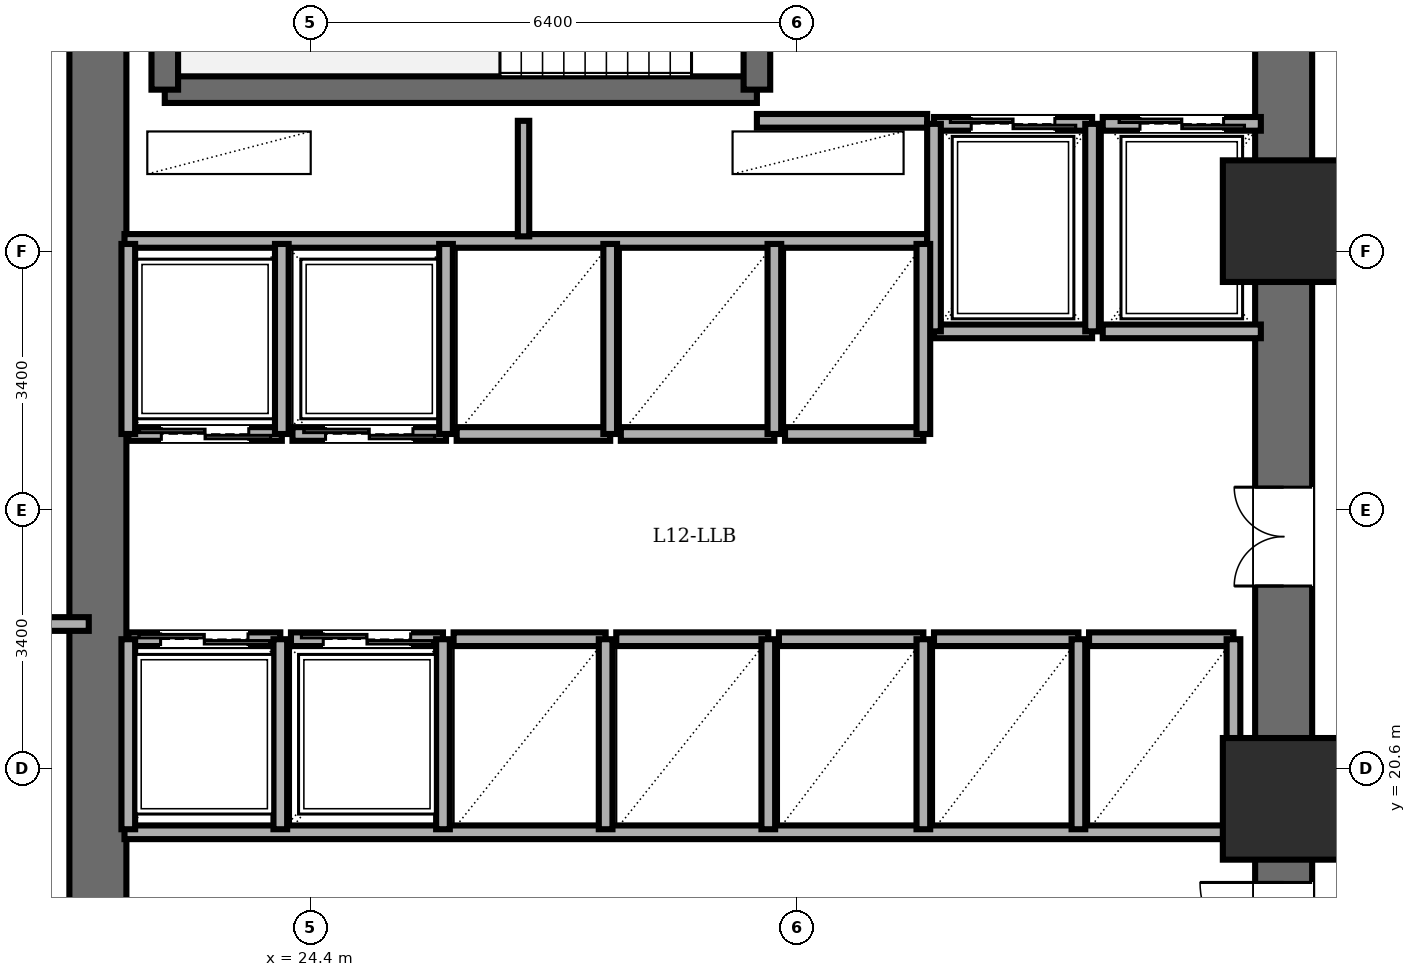
"""IFC4 building model, lengths in metres.
Left out: names, types, materials, properties, quantities, classifications, styles, units other than length and angle.
Written with IfcOpenShell. Run it as: python <this file> out.ifc"""

import sys

from ifc_helpers import new_model, si_unit, direction, frame, frame_2d, origin, origin_2d, place, context, subcontext, project, spatial, rectangle, extrude, element, fill, save


model = new_model("IFC4")
c1 = context("Model", 3, precision=1e-05, world=origin(), true_north=direction((0.0, 1.0)))
c2 = subcontext(c1, "Body", "Model", "MODEL_VIEW")
j1 = project(units=[si_unit("LENGTHUNIT", "METRE"), si_unit("PLANEANGLEUNIT", "RADIAN")], contexts=[c1])
p1 = place(None, origin())
s1 = spatial("IfcSite", under=j1, at=p1, CompositionType="ELEMENT")
p2 = place(p1, origin())
s2 = spatial("IfcBuilding", under=s1, at=p2, CompositionType="ELEMENT")
p3 = place(p2, frame((0.0, 0.0, 46.8)))
s3 = spatial("IfcBuildingStorey", under=s2, at=p3, CompositionType="ELEMENT", Elevation=46.8)
for number, where, z_axis, x_axis in (
    (1, (37.2, 20.2, 0.0), (0.0, 0.0, 1.0), (1.0, 0.0, 0.0)),
    (2, (37.2, 27.8, 0.0), (0.0, 0.0, 1.0), (1.0, 0.0, 0.0)),
):
    element("IfcColumn", number, at=place(p3, frame(where, z_axis=z_axis, x_axis=x_axis)), inside=s3, PredefinedType="COLUMN", context=c2, shape_type="SweptSolid", body=[
        extrude(rectangle(XDim=1.6, YDim=1.6, at=origin_2d()), origin(), (0.0, 0.0, 1.0), 3.6),
    ])
p4 = place(p3, frame((21.6, 14.4, 0.0), z_axis=(0.0, 0.0, 1.0), x_axis=(0.0, 1.0, 0.0)))
e3 = element("IfcWall", 3, at=p4, inside=s3, PredefinedType="SHEAR", context=c2, shape_type="SweptSolid", body=[
    extrude(rectangle(XDim=19.2, YDim=0.75, at=frame_2d((9.6, 0.0))), origin(), (0.0, 0.0, 1.0), 3.4),
])
p5 = place(p3, frame((37.2, 14.4, 0.0), z_axis=(0.0, 0.0, 1.0), x_axis=(0.0, 1.0, 0.0)))
e4 = element("IfcWall", 4, at=p5, inside=s3, PredefinedType="SHEAR", context=c2, shape_type="SweptSolid", body=[
    extrude(rectangle(XDim=19.2, YDim=0.75, at=frame_2d((9.6, 0.0))), origin(), (0.0, 0.0, 1.0), 3.4),
])
p6 = place(p5, frame((15.8, 0.0, 0.0)))
e5 = element("IfcOpeningElement", 5, at=p6, cuts=e4, PredefinedType="OPENING", context=c2, shape_type="SweptSolid", body=[
    extrude(rectangle(XDim=1.15, YDim=2.15, at=frame_2d((0.575, 1.075))), frame((0.0, 0.385, 0.0), z_axis=(0.0, -1.0, 0.0), x_axis=(1.0, 0.0, 0.0)), (0.0, 0.0, 1.0), 0.77),
])
p7 = place(p5, frame((3.6, 0.0, 0.0)))
e6 = element("IfcOpeningElement", 6, at=p7, cuts=e4, PredefinedType="OPENING", context=c2, shape_type="SweptSolid", body=[
    extrude(rectangle(XDim=1.1, YDim=2.15, at=frame_2d((0.55, 1.075))), frame((0.0, 0.385, 0.0), z_axis=(0.0, -1.0, 0.0), x_axis=(1.0, 0.0, 0.0)), (0.0, 0.0, 1.0), 0.77),
])
p8 = place(p5, frame((8.6, 0.0, 0.0)))
e7 = element("IfcOpeningElement", 7, at=p8, cuts=e4, PredefinedType="OPENING", context=c2, shape_type="SweptSolid", body=[
    extrude(rectangle(XDim=1.3, YDim=2.2, at=frame_2d((0.65, 1.1))), frame((0.0, 0.385, 0.0), z_axis=(0.0, -1.0, 0.0), x_axis=(1.0, 0.0, 0.0)), (0.0, 0.0, 1.0), 0.77),
])
p9 = place(p3, frame((22.48, 29.53, 0.0), z_axis=(0.0, 0.0, 1.0), x_axis=(1.0, 0.0, 0.0)))
e8 = element("IfcWall", 8, at=p9, inside=s3, PredefinedType="SOLIDWALL", context=c2, shape_type="SweptSolid", body=[
    extrude(rectangle(XDim=7.79, YDim=0.35, at=frame_2d((3.895, 0.0))), origin(), (0.0, 0.0, 1.0), 3.4),
])
p10 = place(p3, frame((22.48, 29.53, 0.0), z_axis=(0.0, 0.0, 1.0), x_axis=(0.0, 1.0, 0.0)))
e9 = element("IfcWall", 9, at=p10, inside=s3, PredefinedType="SOLIDWALL", context=c2, shape_type="SweptSolid", body=[
    extrude(rectangle(XDim=3.58, YDim=0.35, at=frame_2d((1.79, 0.0))), origin(), (0.0, 0.0, 1.0), 3.4),
])
p11 = place(p3, frame((30.27, 29.53, 0.0), z_axis=(0.0, 0.0, 1.0), x_axis=(0.0, 1.0, 0.0)))
e10 = element("IfcWall", 10, at=p11, inside=s3, PredefinedType="SOLIDWALL", context=c2, shape_type="SweptSolid", body=[
    extrude(rectangle(XDim=3.58, YDim=0.35, at=frame_2d((1.79, 0.0))), origin(), (0.0, 0.0, 1.0), 3.4),
])
p12 = place(p11, frame((1.25, 0.0, 0.0)))
e11 = element("IfcOpeningElement", 11, at=p12, cuts=e10, PredefinedType="OPENING", context=c2, shape_type="SweptSolid", body=[
    extrude(rectangle(XDim=1.1, YDim=2.15, at=frame_2d((0.55, 1.075))), frame((0.0, 0.185, 0.0), z_axis=(0.0, -1.0, 0.0), x_axis=(1.0, 0.0, 0.0)), (0.0, 0.0, 1.0), 0.37),
])
p13 = place(p3, frame((30.27, 29.12, 0.0), z_axis=(0.0, 0.0, 1.0), x_axis=(1.0, 0.0, 0.0)))
e12 = element("IfcWall", 12, at=p13, inside=s3, PredefinedType="PARTITIONING", context=c2, shape_type="SweptSolid", body=[
    extrude(rectangle(XDim=2.24, YDim=0.18, at=frame_2d((1.12, 0.0))), origin(), (0.0, 0.0, 1.0), 3.4),
])
p14 = place(p3, frame((21.95, 27.54, 0.0), z_axis=(0.0, 0.0, 1.0), x_axis=(1.0, 0.0, 0.0)))
e13 = element("IfcWall", 13, at=p14, inside=s3, PredefinedType="PARTITIONING", context=c2, shape_type="SweptSolid", body=[
    extrude(rectangle(XDim=10.56, YDim=0.18, at=frame_2d((5.28, 0.0))), origin(), (0.0, 0.0, 1.0), 3.4),
])
p15 = place(p3, frame((27.2, 27.6, 0.0), z_axis=(0.0, 0.0, 1.0), x_axis=(0.0, 1.0, 0.0)))
e14 = element("IfcWall", 14, at=p15, inside=s3, PredefinedType="PARTITIONING", context=c2, shape_type="SweptSolid", body=[
    extrude(rectangle(XDim=1.52, YDim=0.15, at=frame_2d((0.76, 0.0))), origin(), (0.0, 0.0, 1.0), 3.4),
])
p16 = place(p3, frame((21.95, 19.76, 0.0), z_axis=(0.0, 0.0, 1.0), x_axis=(1.0, 0.0, 0.0)))
e15 = element("IfcWall", 15, at=p16, inside=s3, PredefinedType="PARTITIONING", context=c2, shape_type="SweptSolid", body=[
    extrude(rectangle(XDim=14.87, YDim=0.18, at=frame_2d((7.435, 0.0))), origin(), (0.0, 0.0, 1.0), 3.4),
])
p17 = place(p3, frame((32.6, 29.08, 0.0), z_axis=(0.0, 0.0, 1.0), x_axis=(1.0, 0.0, 0.0)))
e16 = element("IfcWall", 16, at=p17, inside=s3, PredefinedType="PARTITIONING", context=c2, shape_type="SweptSolid", body=[
    extrude(rectangle(XDim=2.08, YDim=0.18, at=frame_2d((1.04, 0.0))), origin(), (0.0, 0.0, 1.0), 3.4),
])
p18 = place(p17, frame((0.49, 0.0, 0.0)))
e17 = element("IfcOpeningElement", 17, at=p18, cuts=e16, PredefinedType="OPENING", context=c2, shape_type="SweptSolid", body=[
    extrude(rectangle(XDim=1.1, YDim=2.2, at=frame_2d((0.55, 1.1))), frame((0.0, 0.1, 0.0), z_axis=(0.0, -1.0, 0.0), x_axis=(1.0, 0.0, 0.0)), (0.0, 0.0, 1.0), 0.2),
])
p19 = place(p3, frame((34.68, 26.35, 0.0), z_axis=(0.0, 0.0, 1.0), x_axis=(-1.0, 0.0, 0.0)))
e18 = element("IfcWall", 18, at=p19, inside=s3, PredefinedType="PARTITIONING", context=c2, shape_type="SweptSolid", body=[
    extrude(rectangle(XDim=2.08, YDim=0.18, at=frame_2d((1.04, 0.0))), origin(), (0.0, 0.0, 1.0), 3.4),
])
for number, where, z_axis, x_axis in (
    (19, (34.68, 26.35, 0.0), (0.0, 0.0, 1.0), (0.0, 1.0, 0.0)),
    (20, (32.6, 29.08, 0.0), (0.0, 0.0, 1.0), (0.0, -1.0, 0.0)),
):
    element("IfcWall", number, at=place(p3, frame(where, z_axis=z_axis, x_axis=x_axis)), inside=s3, PredefinedType="PARTITIONING", context=c2, shape_type="SweptSolid", body=[
        extrude(rectangle(XDim=2.73, YDim=0.18, at=frame_2d((1.365, 0.0))), origin(), (0.0, 0.0, 1.0), 3.4),
    ])
p20 = place(p3, frame((34.82, 29.08, 0.0), z_axis=(0.0, 0.0, 1.0), x_axis=(1.0, 0.0, 0.0)))
e21 = element("IfcWall", 21, at=p20, inside=s3, PredefinedType="PARTITIONING", context=c2, shape_type="SweptSolid", body=[
    extrude(rectangle(XDim=2.08, YDim=0.18, at=frame_2d((1.04, 0.0))), origin(), (0.0, 0.0, 1.0), 3.4),
])
p21 = place(p20, frame((0.49, 0.0, 0.0)))
e22 = element("IfcOpeningElement", 22, at=p21, cuts=e21, PredefinedType="OPENING", context=c2, shape_type="SweptSolid", body=[
    extrude(rectangle(XDim=1.1, YDim=2.2, at=frame_2d((0.55, 1.1))), frame((0.0, 0.1, 0.0), z_axis=(0.0, -1.0, 0.0), x_axis=(1.0, 0.0, 0.0)), (0.0, 0.0, 1.0), 0.2),
])
p22 = place(p3, frame((36.9, 26.35, 0.0), z_axis=(0.0, 0.0, 1.0), x_axis=(-1.0, 0.0, 0.0)))
e23 = element("IfcWall", 23, at=p22, inside=s3, PredefinedType="PARTITIONING", context=c2, shape_type="SweptSolid", body=[
    extrude(rectangle(XDim=2.08, YDim=0.18, at=frame_2d((1.04, 0.0))), origin(), (0.0, 0.0, 1.0), 3.4),
])
p23 = place(p3, frame((24.02, 25.0, 0.0), z_axis=(0.0, 0.0, 1.0), x_axis=(-1.0, 0.0, 0.0)))
e24 = element("IfcWall", 24, at=p23, inside=s3, PredefinedType="PARTITIONING", context=c2, shape_type="SweptSolid", body=[
    extrude(rectangle(XDim=2.02, YDim=0.18, at=frame_2d((1.01, 0.0))), origin(), (0.0, 0.0, 1.0), 3.4),
])
p24 = place(p23, frame((0.435, 0.0, 0.0)))
e25 = element("IfcOpeningElement", 25, at=p24, cuts=e24, PredefinedType="OPENING", context=c2, shape_type="SweptSolid", body=[
    extrude(rectangle(XDim=1.15, YDim=2.2, at=frame_2d((0.575, 1.1))), frame((0.0, 0.1, 0.0), z_axis=(0.0, -1.0, 0.0), x_axis=(1.0, 0.0, 0.0)), (0.0, 0.0, 1.0), 0.2),
])
for number, where, z_axis, x_axis in (
    (26, (24.02, 25.0, 0.0), (0.0, 0.0, 1.0), (0.0, 1.0, 0.0)),
    (27, (22.0, 27.5, 0.0), (0.0, 0.0, 1.0), (0.0, -1.0, 0.0)),
):
    element("IfcWall", number, at=place(p3, frame(where, z_axis=z_axis, x_axis=x_axis)), inside=s3, PredefinedType="PARTITIONING", context=c2, shape_type="SweptSolid", body=[
        extrude(rectangle(XDim=2.5, YDim=0.18, at=frame_2d((1.25, 0.0))), origin(), (0.0, 0.0, 1.0), 3.4),
    ])
p25 = place(p3, frame((26.18, 25.0, 0.0), z_axis=(0.0, 0.0, 1.0), x_axis=(-1.0, 0.0, 0.0)))
e28 = element("IfcWall", 28, at=p25, inside=s3, PredefinedType="PARTITIONING", context=c2, shape_type="SweptSolid", body=[
    extrude(rectangle(XDim=2.02, YDim=0.18, at=frame_2d((1.01, 0.0))), origin(), (0.0, 0.0, 1.0), 3.4),
])
p26 = place(p25, frame((0.435, 0.0, 0.0)))
e29 = element("IfcOpeningElement", 29, at=p26, cuts=e28, PredefinedType="OPENING", context=c2, shape_type="SweptSolid", body=[
    extrude(rectangle(XDim=1.15, YDim=2.2, at=frame_2d((0.575, 1.1))), frame((0.0, 0.1, 0.0), z_axis=(0.0, -1.0, 0.0), x_axis=(1.0, 0.0, 0.0)), (0.0, 0.0, 1.0), 0.2),
])
p27 = place(p3, frame((26.18, 25.0, 0.0), z_axis=(0.0, 0.0, 1.0), x_axis=(0.0, 1.0, 0.0)))
e30 = element("IfcWall", 30, at=p27, inside=s3, PredefinedType="PARTITIONING", context=c2, shape_type="SweptSolid", body=[
    extrude(rectangle(XDim=2.5, YDim=0.18, at=frame_2d((1.25, 0.0))), origin(), (0.0, 0.0, 1.0), 3.4),
])
p28 = place(p3, frame((22.0, 22.3, 0.0), z_axis=(0.0, 0.0, 1.0), x_axis=(1.0, 0.0, 0.0)))
e31 = element("IfcWall", 31, at=p28, inside=s3, PredefinedType="PARTITIONING", context=c2, shape_type="SweptSolid", body=[
    extrude(rectangle(XDim=2.0, YDim=0.18, at=frame_2d((1.0, 0.0))), origin(), (0.0, 0.0, 1.0), 3.4),
])
p29 = place(p28, frame((0.425, 0.0, 0.0)))
e32 = element("IfcOpeningElement", 32, at=p29, cuts=e31, PredefinedType="OPENING", context=c2, shape_type="SweptSolid", body=[
    extrude(rectangle(XDim=1.15, YDim=2.2, at=frame_2d((0.575, 1.1))), frame((0.0, 0.1, 0.0), z_axis=(0.0, -1.0, 0.0), x_axis=(1.0, 0.0, 0.0)), (0.0, 0.0, 1.0), 0.2),
])
for number, where, z_axis, x_axis in (
    (33, (24.0, 19.8, 0.0), (0.0, 0.0, 1.0), (0.0, 1.0, 0.0)),
    (34, (22.0, 22.3, 0.0), (0.0, 0.0, 1.0), (0.0, -1.0, 0.0)),
):
    element("IfcWall", number, at=place(p3, frame(where, z_axis=z_axis, x_axis=x_axis)), inside=s3, PredefinedType="PARTITIONING", context=c2, shape_type="SweptSolid", body=[
        extrude(rectangle(XDim=2.5, YDim=0.18, at=frame_2d((1.25, 0.0))), origin(), (0.0, 0.0, 1.0), 3.4),
    ])
p30 = place(p3, frame((24.14, 22.3, 0.0), z_axis=(0.0, 0.0, 1.0), x_axis=(1.0, 0.0, 0.0)))
e35 = element("IfcWall", 35, at=p30, inside=s3, PredefinedType="PARTITIONING", context=c2, shape_type="SweptSolid", body=[
    extrude(rectangle(XDim=2.0, YDim=0.18, at=frame_2d((1.0, 0.0))), origin(), (0.0, 0.0, 1.0), 3.4),
])
p31 = place(p30, frame((0.425, 0.0, 0.0)))
e36 = element("IfcOpeningElement", 36, at=p31, cuts=e35, PredefinedType="OPENING", context=c2, shape_type="SweptSolid", body=[
    extrude(rectangle(XDim=1.15, YDim=2.2, at=frame_2d((0.575, 1.1))), frame((0.0, 0.1, 0.0), z_axis=(0.0, -1.0, 0.0), x_axis=(1.0, 0.0, 0.0)), (0.0, 0.0, 1.0), 0.2),
])
p32 = place(p3, frame((26.14, 19.8, 0.0), z_axis=(0.0, 0.0, 1.0), x_axis=(0.0, 1.0, 0.0)))
e37 = element("IfcWall", 37, at=p32, inside=s3, PredefinedType="PARTITIONING", context=c2, shape_type="SweptSolid", body=[
    extrude(rectangle(XDim=2.5, YDim=0.18, at=frame_2d((1.25, 0.0))), origin(), (0.0, 0.0, 1.0), 3.4),
])
p33 = place(p3, frame((28.34, 25.0, 0.0), z_axis=(0.0, 0.0, 1.0), x_axis=(-1.0, 0.0, 0.0)))
e38 = element("IfcWall", 38, at=p33, inside=s3, PredefinedType="PARTITIONING", context=c2, shape_type="SweptSolid", body=[
    extrude(rectangle(XDim=2.02, YDim=0.18, at=frame_2d((1.01, 0.0))), origin(), (0.0, 0.0, 1.0), 3.4),
])
p34 = place(p3, frame((28.34, 25.0, 0.0), z_axis=(0.0, 0.0, 1.0), x_axis=(0.0, 1.0, 0.0)))
e39 = element("IfcWall", 39, at=p34, inside=s3, PredefinedType="PARTITIONING", context=c2, shape_type="SweptSolid", body=[
    extrude(rectangle(XDim=2.5, YDim=0.18, at=frame_2d((1.25, 0.0))), origin(), (0.0, 0.0, 1.0), 3.4),
])
p35 = place(p3, frame((30.5, 25.0, 0.0), z_axis=(0.0, 0.0, 1.0), x_axis=(-1.0, 0.0, 0.0)))
e40 = element("IfcWall", 40, at=p35, inside=s3, PredefinedType="PARTITIONING", context=c2, shape_type="SweptSolid", body=[
    extrude(rectangle(XDim=2.02, YDim=0.18, at=frame_2d((1.01, 0.0))), origin(), (0.0, 0.0, 1.0), 3.4),
])
p36 = place(p3, frame((30.5, 25.0, 0.0), z_axis=(0.0, 0.0, 1.0), x_axis=(0.0, 1.0, 0.0)))
e41 = element("IfcWall", 41, at=p36, inside=s3, PredefinedType="PARTITIONING", context=c2, shape_type="SweptSolid", body=[
    extrude(rectangle(XDim=2.5, YDim=0.18, at=frame_2d((1.25, 0.0))), origin(), (0.0, 0.0, 1.0), 3.4),
])
p37 = place(p3, frame((26.28, 22.3, 0.0), z_axis=(0.0, 0.0, 1.0), x_axis=(1.0, 0.0, 0.0)))
e42 = element("IfcWall", 42, at=p37, inside=s3, PredefinedType="PARTITIONING", context=c2, shape_type="SweptSolid", body=[
    extrude(rectangle(XDim=2.0, YDim=0.18, at=frame_2d((1.0, 0.0))), origin(), (0.0, 0.0, 1.0), 3.4),
])
p38 = place(p3, frame((28.28, 19.8, 0.0), z_axis=(0.0, 0.0, 1.0), x_axis=(0.0, 1.0, 0.0)))
e43 = element("IfcWall", 43, at=p38, inside=s3, PredefinedType="PARTITIONING", context=c2, shape_type="SweptSolid", body=[
    extrude(rectangle(XDim=2.5, YDim=0.18, at=frame_2d((1.25, 0.0))), origin(), (0.0, 0.0, 1.0), 3.4),
])
p39 = place(p3, frame((28.42, 22.3, 0.0), z_axis=(0.0, 0.0, 1.0), x_axis=(1.0, 0.0, 0.0)))
e44 = element("IfcWall", 44, at=p39, inside=s3, PredefinedType="PARTITIONING", context=c2, shape_type="SweptSolid", body=[
    extrude(rectangle(XDim=2.0, YDim=0.18, at=frame_2d((1.0, 0.0))), origin(), (0.0, 0.0, 1.0), 3.4),
])
p40 = place(p3, frame((30.42, 19.8, 0.0), z_axis=(0.0, 0.0, 1.0), x_axis=(0.0, 1.0, 0.0)))
e45 = element("IfcWall", 45, at=p40, inside=s3, PredefinedType="PARTITIONING", context=c2, shape_type="SweptSolid", body=[
    extrude(rectangle(XDim=2.5, YDim=0.18, at=frame_2d((1.25, 0.0))), origin(), (0.0, 0.0, 1.0), 3.4),
])
p41 = place(p3, frame((32.46, 25.0, 0.0), z_axis=(0.0, 0.0, 1.0), x_axis=(-1.0, 0.0, 0.0)))
e46 = element("IfcWall", 46, at=p41, inside=s3, PredefinedType="PARTITIONING", context=c2, shape_type="SweptSolid", body=[
    extrude(rectangle(XDim=1.82, YDim=0.18, at=frame_2d((0.91, 0.0))), origin(), (0.0, 0.0, 1.0), 3.4),
])
p42 = place(p3, frame((32.46, 25.0, 0.0), z_axis=(0.0, 0.0, 1.0), x_axis=(0.0, 1.0, 0.0)))
e47 = element("IfcWall", 47, at=p42, inside=s3, PredefinedType="PARTITIONING", context=c2, shape_type="SweptSolid", body=[
    extrude(rectangle(XDim=2.5, YDim=0.18, at=frame_2d((1.25, 0.0))), origin(), (0.0, 0.0, 1.0), 3.4),
])
p43 = place(p3, frame((30.56, 22.3, 0.0), z_axis=(0.0, 0.0, 1.0), x_axis=(1.0, 0.0, 0.0)))
e48 = element("IfcWall", 48, at=p43, inside=s3, PredefinedType="PARTITIONING", context=c2, shape_type="SweptSolid", body=[
    extrude(rectangle(XDim=1.9, YDim=0.18, at=frame_2d((0.95, 0.0))), origin(), (0.0, 0.0, 1.0), 3.4),
])
p44 = place(p3, frame((32.46, 19.8, 0.0), z_axis=(0.0, 0.0, 1.0), x_axis=(0.0, 1.0, 0.0)))
e49 = element("IfcWall", 49, at=p44, inside=s3, PredefinedType="PARTITIONING", context=c2, shape_type="SweptSolid", body=[
    extrude(rectangle(XDim=2.5, YDim=0.18, at=frame_2d((1.25, 0.0))), origin(), (0.0, 0.0, 1.0), 3.4),
])
p45 = place(p3, frame((32.6, 22.3, 0.0), z_axis=(0.0, 0.0, 1.0), x_axis=(1.0, 0.0, 0.0)))
e50 = element("IfcWall", 50, at=p45, inside=s3, PredefinedType="PARTITIONING", context=c2, shape_type="SweptSolid", body=[
    extrude(rectangle(XDim=1.9, YDim=0.18, at=frame_2d((0.95, 0.0))), origin(), (0.0, 0.0, 1.0), 3.4),
])
p46 = place(p3, frame((34.5, 19.8, 0.0), z_axis=(0.0, 0.0, 1.0), x_axis=(0.0, 1.0, 0.0)))
e51 = element("IfcWall", 51, at=p46, inside=s3, PredefinedType="PARTITIONING", context=c2, shape_type="SweptSolid", body=[
    extrude(rectangle(XDim=2.5, YDim=0.18, at=frame_2d((1.25, 0.0))), origin(), (0.0, 0.0, 1.0), 3.4),
])
p47 = place(p3, frame((34.64, 22.3, 0.0), z_axis=(0.0, 0.0, 1.0), x_axis=(1.0, 0.0, 0.0)))
e52 = element("IfcWall", 52, at=p47, inside=s3, PredefinedType="PARTITIONING", context=c2, shape_type="SweptSolid", body=[
    extrude(rectangle(XDim=1.9, YDim=0.18, at=frame_2d((0.95, 0.0))), origin(), (0.0, 0.0, 1.0), 3.4),
])
p48 = place(p3, frame((36.54, 19.8, 0.0), z_axis=(0.0, 0.0, 1.0), x_axis=(0.0, 1.0, 0.0)))
e53 = element("IfcWall", 53, at=p48, inside=s3, PredefinedType="PARTITIONING", context=c2, shape_type="SweptSolid", body=[
    extrude(rectangle(XDim=2.5, YDim=0.18, at=frame_2d((1.25, 0.0))), origin(), (0.0, 0.0, 1.0), 3.4),
])
p49 = place(p3, frame((3.4, 22.5, 0.0), z_axis=(0.0, 0.0, 1.0), x_axis=(1.0, 0.0, 0.0)))
e54 = element("IfcWall", 54, at=p49, inside=s3, PredefinedType="PARTITIONING", context=c2, shape_type="SweptSolid", body=[
    extrude(rectangle(XDim=18.08, YDim=0.18, at=frame_2d((9.04, 0.0))), origin(), (0.0, 0.0, 1.0), 3.4),
])
p50 = place(p7, origin())
e55 = element("IfcDoor", 55, at=p50, inside=s3, OperationType="SINGLE_SWING_RIGHT", PredefinedType="DOOR", context=c2, shape_type="SweptSolid", body=[
    extrude(rectangle(XDim=1.1, YDim=2.15, at=frame_2d((0.55, 1.075))), frame((0.0, 0.025, 0.0), z_axis=(0.0, -1.0, 0.0), x_axis=(1.0, 0.0, 0.0)), (0.0, 0.0, 1.0), 0.05),
])
fill(e6, e55)
p51 = place(p18, origin())
e56 = element("IfcDoor", 56, at=p51, inside=s3, OperationType="DOUBLE_DOOR_SLIDING", PredefinedType="DOOR", context=c2, shape_type="SweptSolid", body=[
    extrude(rectangle(XDim=1.1, YDim=2.2, at=frame_2d((0.55, 1.1))), frame((0.0, 0.025, 0.0), z_axis=(0.0, -1.0, 0.0), x_axis=(1.0, 0.0, 0.0)), (0.0, 0.0, 1.0), 0.05),
])
fill(e17, e56)
p52 = place(p21, origin())
e57 = element("IfcDoor", 57, at=p52, inside=s3, OperationType="DOUBLE_DOOR_SLIDING", PredefinedType="DOOR", context=c2, shape_type="SweptSolid", body=[
    extrude(rectangle(XDim=1.1, YDim=2.2, at=frame_2d((0.55, 1.1))), frame((0.0, 0.025, 0.0), z_axis=(0.0, -1.0, 0.0), x_axis=(1.0, 0.0, 0.0)), (0.0, 0.0, 1.0), 0.05),
])
fill(e22, e57)
p53 = place(p24, origin())
e58 = element("IfcDoor", 58, at=p53, inside=s3, OperationType="DOUBLE_DOOR_SLIDING", PredefinedType="DOOR", context=c2, shape_type="SweptSolid", body=[
    extrude(rectangle(XDim=1.15, YDim=2.2, at=frame_2d((0.575, 1.1))), frame((0.0, 0.025, 0.0), z_axis=(0.0, -1.0, 0.0), x_axis=(1.0, 0.0, 0.0)), (0.0, 0.0, 1.0), 0.05),
])
fill(e25, e58)
p54 = place(p26, origin())
e59 = element("IfcDoor", 59, at=p54, inside=s3, OperationType="DOUBLE_DOOR_SLIDING", PredefinedType="DOOR", context=c2, shape_type="SweptSolid", body=[
    extrude(rectangle(XDim=1.15, YDim=2.2, at=frame_2d((0.575, 1.1))), frame((0.0, 0.025, 0.0), z_axis=(0.0, -1.0, 0.0), x_axis=(1.0, 0.0, 0.0)), (0.0, 0.0, 1.0), 0.05),
])
fill(e29, e59)
p55 = place(p29, origin())
e60 = element("IfcDoor", 60, at=p55, inside=s3, OperationType="DOUBLE_DOOR_SLIDING", PredefinedType="DOOR", context=c2, shape_type="SweptSolid", body=[
    extrude(rectangle(XDim=1.15, YDim=2.2, at=frame_2d((0.575, 1.1))), frame((0.0, 0.025, 0.0), z_axis=(0.0, -1.0, 0.0), x_axis=(1.0, 0.0, 0.0)), (0.0, 0.0, 1.0), 0.05),
])
fill(e32, e60)
p56 = place(p31, origin())
e61 = element("IfcDoor", 61, at=p56, inside=s3, OperationType="DOUBLE_DOOR_SLIDING", PredefinedType="DOOR", context=c2, shape_type="SweptSolid", body=[
    extrude(rectangle(XDim=1.15, YDim=2.2, at=frame_2d((0.575, 1.1))), frame((0.0, 0.025, 0.0), z_axis=(0.0, -1.0, 0.0), x_axis=(1.0, 0.0, 0.0)), (0.0, 0.0, 1.0), 0.05),
])
fill(e36, e61)
p57 = place(p8, origin())
e62 = element("IfcDoor", 62, at=p57, inside=s3, OperationType="DOUBLE_DOOR_SINGLE_SWING", PredefinedType="DOOR", context=c2, shape_type="SweptSolid", body=[
    extrude(rectangle(XDim=1.3, YDim=2.2, at=frame_2d((0.65, 1.1))), frame((0.0, 0.025, 0.0), z_axis=(0.0, -1.0, 0.0), x_axis=(1.0, 0.0, 0.0)), (0.0, 0.0, 1.0), 0.05),
])
fill(e7, e62)
save(model, sys.argv[1])
